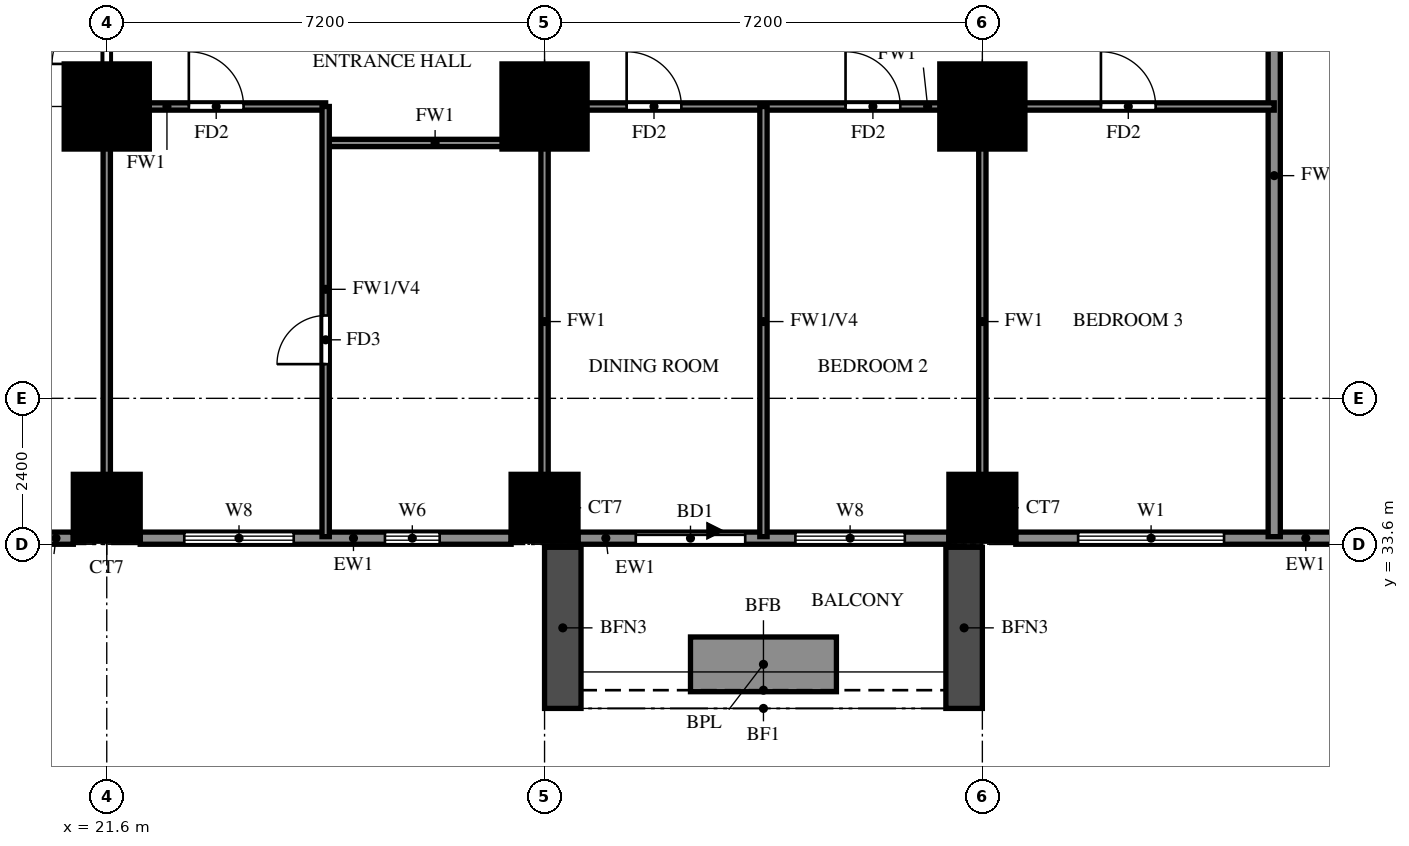
"""IFC4 building model, lengths in metres.
Left out: names, types, materials, properties, quantities, classifications, styles, units other than length and angle.
Written with IfcOpenShell. Run it as: python <this file> out.ifc"""

import sys

from ifc_helpers import new_model, si_unit, direction, frame, frame_2d, origin, origin_2d, place, context, subcontext, project, spatial, rectangle, extrude, source, transform, mapped, element, fill, save


model = new_model("IFC4")
c1 = context("Model", 3, precision=1e-05, world=origin(), true_north=direction((0.0, 1.0)))
c2 = subcontext(c1, "Body", "Model", "MODEL_VIEW")
j1 = project(units=[si_unit("LENGTHUNIT", "METRE"), si_unit("PLANEANGLEUNIT", "RADIAN")], contexts=[c1])
p1 = place(None, origin())
s1 = spatial("IfcSite", under=j1, at=p1, CompositionType="ELEMENT")
p2 = place(p1, origin())
s2 = spatial("IfcBuilding", under=s1, at=p2, CompositionType="ELEMENT")
p3 = place(p2, frame((0.0, 0.0, 55.0)))
s3 = spatial("IfcBuildingStorey", under=s2, at=p3, CompositionType="ELEMENT", Elevation=55.0)
m1 = source(origin(), c2, "Body", "SweptSolid", [
    extrude(rectangle(XDim=1.1, YDim=1.1, at=origin_2d()), origin(), (0.0, 0.0, 1.0), 3.18),
])
for number, where, z_axis, x_axis in (
    (1, (21.6, 34.2, 0.0), (0.0, 0.0, 1.0), (1.0, 0.0, 0.0)),
    (2, (28.8, 34.2, 0.0), (0.0, 0.0, 1.0), (1.0, 0.0, 0.0)),
    (3, (36.0, 34.2, 0.0), (0.0, 0.0, 1.0), (1.0, 0.0, 0.0)),
):
    element("IfcColumn", number, at=place(p3, frame(where, z_axis=z_axis, x_axis=x_axis)), inside=s3, PredefinedType="COLUMN", context=c2, shape_type="MappedRepresentation", body=[
        mapped(m1, transform((0.0, 0.0, 0.0))),
    ])
m2 = source(origin(), c2, "Body", "SweptSolid", [
    extrude(rectangle(XDim=1.4, YDim=1.4, at=origin_2d()), origin(), (0.0, 0.0, 1.0), 3.18),
])
for number, where, z_axis, x_axis in (
    (4, (21.6, 40.8, 0.0), (0.0, 0.0, 1.0), (1.0, 0.0, 0.0)),
    (5, (28.8, 40.8, 0.0), (0.0, 0.0, 1.0), (1.0, 0.0, 0.0)),
    (6, (36.0, 40.8, 0.0), (0.0, 0.0, 1.0), (1.0, 0.0, 0.0)),
):
    element("IfcColumn", number, at=place(p3, frame(where, z_axis=z_axis, x_axis=x_axis)), inside=s3, PredefinedType="COLUMN", context=c2, shape_type="MappedRepresentation", body=[
        mapped(m2, transform((0.0, 0.0, 0.0))),
    ])
p4 = place(p3, frame((18.2, 33.7, 0.0), z_axis=(0.0, 0.0, 1.0), x_axis=(1.0, 0.0, 0.0)))
e7 = element("IfcWall", 7, at=p4, inside=s3, PredefinedType="SOLIDWALL", context=c2, shape_type="SweptSolid", body=[
    extrude(rectangle(XDim=2.85, YDim=0.2, at=frame_2d((1.425, 0.0))), origin(), (0.0, 0.0, 1.0), 3.18),
])
p5 = place(p4, frame((0.525, 0.0, 0.6)))
e8 = element("IfcOpeningElement", 8, at=p5, cuts=e7, PredefinedType="OPENING", context=c2, shape_type="SweptSolid", body=[
    extrude(rectangle(XDim=1.8, YDim=2.4, at=frame_2d((0.9, 1.2))), frame((0.0, 0.11, 0.0), z_axis=(0.0, -1.0, 0.0), x_axis=(1.0, 0.0, 0.0)), (0.0, 0.0, 1.0), 0.22),
])
p6 = place(p3, frame((22.15, 33.7, 0.0), z_axis=(0.0, 0.0, 1.0), x_axis=(1.0, 0.0, 0.0)))
e9 = element("IfcWall", 9, at=p6, inside=s3, PredefinedType="SOLIDWALL", context=c2, shape_type="SweptSolid", body=[
    extrude(rectangle(XDim=6.1, YDim=0.2, at=frame_2d((3.05, 0.0))), origin(), (0.0, 0.0, 1.0), 3.18),
])
p7 = place(p6, frame((0.725, 0.0, 0.6)))
e10 = element("IfcOpeningElement", 10, at=p7, cuts=e9, PredefinedType="OPENING", context=c2, shape_type="SweptSolid", body=[
    extrude(rectangle(XDim=1.8, YDim=2.4, at=frame_2d((0.9, 1.2))), frame((0.0, 0.11, 0.0), z_axis=(0.0, -1.0, 0.0), x_axis=(1.0, 0.0, 0.0)), (0.0, 0.0, 1.0), 0.22),
])
p8 = place(p6, frame((4.025, 0.0, 1.5)))
e11 = element("IfcOpeningElement", 11, at=p8, cuts=e9, PredefinedType="OPENING", context=c2, shape_type="SweptSolid", body=[
    extrude(rectangle(XDim=0.9, YDim=0.9, at=frame_2d((0.45, 0.45))), frame((0.0, 0.11, 0.0), z_axis=(0.0, -1.0, 0.0), x_axis=(1.0, 0.0, 0.0)), (0.0, 0.0, 1.0), 0.22),
])
p9 = place(p3, frame((29.35, 33.7, 0.0), z_axis=(0.0, 0.0, 1.0), x_axis=(1.0, 0.0, 0.0)))
e12 = element("IfcWall", 12, at=p9, inside=s3, PredefinedType="SOLIDWALL", context=c2, shape_type="SweptSolid", body=[
    extrude(rectangle(XDim=6.1, YDim=0.2, at=frame_2d((3.05, 0.0))), origin(), (0.0, 0.0, 1.0), 3.18),
])
p10 = place(p9, frame((0.95, 0.0, 0.0)))
e13 = element("IfcOpeningElement", 13, at=p10, cuts=e12, PredefinedType="OPENING", context=c2, shape_type="SweptSolid", body=[
    extrude(rectangle(XDim=1.8, YDim=2.4, at=frame_2d((0.9, 1.2))), frame((0.0, 0.11, 0.0), z_axis=(0.0, -1.0, 0.0), x_axis=(1.0, 0.0, 0.0)), (0.0, 0.0, 1.0), 0.22),
])
p11 = place(p9, frame((3.575, 0.0, 0.6)))
e14 = element("IfcOpeningElement", 14, at=p11, cuts=e12, PredefinedType="OPENING", context=c2, shape_type="SweptSolid", body=[
    extrude(rectangle(XDim=1.8, YDim=2.4, at=frame_2d((0.9, 1.2))), frame((0.0, 0.11, 0.0), z_axis=(0.0, -1.0, 0.0), x_axis=(1.0, 0.0, 0.0)), (0.0, 0.0, 1.0), 0.22),
])
p12 = place(p3, frame((36.55, 33.7, 0.0), z_axis=(0.0, 0.0, 1.0), x_axis=(1.0, 0.0, 0.0)))
e15 = element("IfcWall", 15, at=p12, inside=s3, PredefinedType="SOLIDWALL", context=c2, shape_type="SweptSolid", body=[
    extrude(rectangle(XDim=5.45, YDim=0.2, at=frame_2d((2.725, 0.0))), origin(), (0.0, 0.0, 1.0), 3.18),
])
p13 = place(p12, frame((1.025, 0.0, 0.6)))
e16 = element("IfcOpeningElement", 16, at=p13, cuts=e15, PredefinedType="OPENING", context=c2, shape_type="SweptSolid", body=[
    extrude(rectangle(XDim=2.4, YDim=2.4, at=frame_2d((1.2, 1.2))), frame((0.0, 0.11, 0.0), z_axis=(0.0, -1.0, 0.0), x_axis=(1.0, 0.0, 0.0)), (0.0, 0.0, 1.0), 0.22),
])
for number, where, z_axis, x_axis in (
    (17, (29.1, 33.55, 0.0), (0.0, 0.0, 1.0), (0.0, -1.0, 0.0)),
    (18, (35.7, 33.55, 0.0), (0.0, 0.0, 1.0), (0.0, -1.0, 0.0)),
):
    element("IfcWall", number, at=place(p3, frame(where, z_axis=z_axis, x_axis=x_axis)), inside=s3, PredefinedType="SOLIDWALL", context=c2, shape_type="SweptSolid", body=[
        extrude(rectangle(XDim=2.65, YDim=0.6, at=frame_2d((1.325, 0.0))), origin(), (0.0, 0.0, 1.0), 2.85),
    ])
p14 = place(p3, frame((31.2, 31.625, 0.0), z_axis=(0.0, 0.0, 1.0), x_axis=(1.0, 0.0, 0.0)))
e19 = element("IfcWall", 19, at=p14, inside=s3, PredefinedType="SOLIDWALL", context=c2, shape_type="SweptSolid", body=[
    extrude(rectangle(XDim=2.4, YDim=0.9, at=frame_2d((1.2, 0.0))), origin(), (0.0, 0.0, 1.0), 0.9),
])
p15 = place(p3, frame((40.8, 33.725, 0.0), z_axis=(0.0, 0.0, 1.0), x_axis=(0.0, 1.0, 0.0)))
e20 = element("IfcWall", 20, at=p15, inside=s3, PredefinedType="SOLIDWALL", context=c2, shape_type="SweptSolid", body=[
    extrude(rectangle(XDim=11.875, YDim=0.2, at=frame_2d((5.938, 0.0))), origin(), (0.0, 0.0, 1.0), 2.28),
])
p16 = place(p3, frame((25.2, 40.2, 0.0), z_axis=(0.0, 0.0, 1.0), x_axis=(1.0, 0.0, 0.0)))
e21 = element("IfcWall", 21, at=p16, inside=s3, PredefinedType="PARTITIONING", context=c2, shape_type="SweptSolid", body=[
    extrude(rectangle(XDim=3.6, YDim=0.12, at=frame_2d((1.8, 0.0))), origin(), (0.0, 0.0, 1.0), 3.18),
])
p17 = place(p3, frame((21.6, 40.8, 0.0), z_axis=(0.0, 0.0, 1.0), x_axis=(1.0, 0.0, 0.0)))
e22 = element("IfcWall", 22, at=p17, inside=s3, PredefinedType="PARTITIONING", context=c2, shape_type="SweptSolid", body=[
    extrude(rectangle(XDim=3.6, YDim=0.12, at=frame_2d((1.8, 0.0))), origin(), (0.0, 0.0, 1.0), 3.18),
])
p18 = place(p17, frame((1.35, 0.0, 0.0)))
e23 = element("IfcOpeningElement", 23, at=p18, cuts=e22, PredefinedType="OPENING", context=c2, shape_type="SweptSolid", body=[
    extrude(rectangle(XDim=0.9, YDim=2.1, at=frame_2d((0.45, 1.05))), frame((0.0, 0.07, 0.0), z_axis=(0.0, -1.0, 0.0), x_axis=(1.0, 0.0, 0.0)), (0.0, 0.0, 1.0), 0.14),
])
p19 = place(p3, frame((28.8, 40.8, 0.0), z_axis=(0.0, 0.0, 1.0), x_axis=(1.0, 0.0, 0.0)))
e24 = element("IfcWall", 24, at=p19, inside=s3, PredefinedType="PARTITIONING", context=c2, shape_type="SweptSolid", body=[
    extrude(rectangle(XDim=12.0, YDim=0.12, at=frame_2d((6.0, 0.0))), origin(), (0.0, 0.0, 1.0), 3.18),
])
p20 = place(p19, frame((1.35, 0.0, 0.0)))
e25 = element("IfcOpeningElement", 25, at=p20, cuts=e24, PredefinedType="OPENING", context=c2, shape_type="SweptSolid", body=[
    extrude(rectangle(XDim=0.9, YDim=2.1, at=frame_2d((0.45, 1.05))), frame((0.0, 0.07, 0.0), z_axis=(0.0, -1.0, 0.0), x_axis=(1.0, 0.0, 0.0)), (0.0, 0.0, 1.0), 0.14),
])
p21 = place(p19, frame((4.95, 0.0, 0.0)))
e26 = element("IfcOpeningElement", 26, at=p21, cuts=e24, PredefinedType="OPENING", context=c2, shape_type="SweptSolid", body=[
    extrude(rectangle(XDim=0.9, YDim=2.1, at=frame_2d((0.45, 1.05))), frame((0.0, 0.07, 0.0), z_axis=(0.0, -1.0, 0.0), x_axis=(1.0, 0.0, 0.0)), (0.0, 0.0, 1.0), 0.14),
])
p22 = place(p19, frame((9.15, 0.0, 0.0)))
e27 = element("IfcOpeningElement", 27, at=p22, cuts=e24, PredefinedType="OPENING", context=c2, shape_type="SweptSolid", body=[
    extrude(rectangle(XDim=0.9, YDim=2.1, at=frame_2d((0.45, 1.05))), frame((0.0, 0.07, 0.0), z_axis=(0.0, -1.0, 0.0), x_axis=(1.0, 0.0, 0.0)), (0.0, 0.0, 1.0), 0.14),
])
p23 = place(p3, frame((21.6, 33.725, 0.0), z_axis=(0.0, 0.0, 1.0), x_axis=(0.0, 1.0, 0.0)))
e28 = element("IfcWall", 28, at=p23, inside=s3, PredefinedType="PARTITIONING", context=c2, shape_type="SweptSolid", body=[
    extrude(rectangle(XDim=17.875, YDim=0.12, at=frame_2d((8.938, 0.0))), origin(), (0.0, 0.0, 1.0), 3.18),
])
p24 = place(p23, frame((7.775, 0.0, 0.0)))
e29 = element("IfcOpeningElement", 29, at=p24, cuts=e28, PredefinedType="OPENING", context=c2, shape_type="SweptSolid", body=[
    extrude(rectangle(XDim=0.9, YDim=2.1, at=frame_2d((0.45, 1.05))), frame((0.0, 0.07, 0.0), z_axis=(0.0, -1.0, 0.0), x_axis=(1.0, 0.0, 0.0)), (0.0, 0.0, 1.0), 0.14),
])
p25 = place(p23, frame((15.625, 0.0, 0.0)))
e30 = element("IfcOpeningElement", 30, at=p25, cuts=e28, PredefinedType="OPENING", context=c2, shape_type="SweptSolid", body=[
    extrude(rectangle(XDim=0.9, YDim=2.1, at=frame_2d((0.45, 1.05))), frame((0.0, 0.07, 0.0), z_axis=(0.0, -1.0, 0.0), x_axis=(1.0, 0.0, 0.0)), (0.0, 0.0, 1.0), 0.14),
])
p26 = place(p3, frame((25.2, 33.725, 0.0), z_axis=(0.0, 0.0, 1.0), x_axis=(0.0, 1.0, 0.0)))
e31 = element("IfcWall", 31, at=p26, inside=s3, PredefinedType="PARTITIONING", context=c2, shape_type="SweptSolid", body=[
    extrude(rectangle(XDim=7.075, YDim=0.12, at=frame_2d((3.538, 0.0))), origin(), (0.0, 0.0, 1.0), 2.28),
])
p27 = place(p26, frame((2.837, 0.0, 0.0)))
e32 = element("IfcOpeningElement", 32, at=p27, cuts=e31, PredefinedType="OPENING", context=c2, shape_type="SweptSolid", body=[
    extrude(rectangle(XDim=0.8, YDim=2.1, at=frame_2d((0.4, 1.05))), frame((0.0, 0.07, 0.0), z_axis=(0.0, -1.0, 0.0), x_axis=(1.0, 0.0, 0.0)), (0.0, 0.0, 1.0), 0.14),
])
p28 = place(p3, frame((28.8, 33.725, 0.0), z_axis=(0.0, 0.0, 1.0), x_axis=(0.0, 1.0, 0.0)))
e33 = element("IfcWall", 33, at=p28, inside=s3, PredefinedType="PARTITIONING", context=c2, shape_type="SweptSolid", body=[
    extrude(rectangle(XDim=7.075, YDim=0.12, at=frame_2d((3.538, 0.0))), origin(), (0.0, 0.0, 1.0), 3.18),
])
p29 = place(p3, frame((32.4, 33.725, 0.0), z_axis=(0.0, 0.0, 1.0), x_axis=(0.0, 1.0, 0.0)))
e34 = element("IfcWall", 34, at=p29, inside=s3, PredefinedType="PARTITIONING", context=c2, shape_type="SweptSolid", body=[
    extrude(rectangle(XDim=7.075, YDim=0.12, at=frame_2d((3.538, 0.0))), origin(), (0.0, 0.0, 1.0), 2.28),
])
p30 = place(p3, frame((36.0, 33.725, 0.0), z_axis=(0.0, 0.0, 1.0), x_axis=(0.0, 1.0, 0.0)))
e35 = element("IfcWall", 35, at=p30, inside=s3, PredefinedType="PARTITIONING", context=c2, shape_type="SweptSolid", body=[
    extrude(rectangle(XDim=7.075, YDim=0.12, at=frame_2d((3.538, 0.0))), origin(), (0.0, 0.0, 1.0), 3.18),
])
p31 = place(p7, origin())
e36 = element("IfcWindow", 36, at=p31, inside=s3, PartitioningType="DOUBLE_PANEL_VERTICAL", PredefinedType="WINDOW", context=c2, shape_type="SweptSolid", body=[
    extrude(rectangle(XDim=1.8, YDim=2.4, at=frame_2d((0.9, 1.2))), frame((0.0, 0.03, 0.0), z_axis=(0.0, -1.0, 0.0), x_axis=(1.0, 0.0, 0.0)), (0.0, 0.0, 1.0), 0.06),
])
fill(e10, e36)
p32 = place(p8, origin())
e37 = element("IfcWindow", 37, at=p32, inside=s3, PartitioningType="SINGLE_PANEL", PredefinedType="WINDOW", context=c2, shape_type="SweptSolid", body=[
    extrude(rectangle(XDim=0.9, YDim=0.9, at=frame_2d((0.45, 0.45))), frame((0.0, 0.03, 0.0), z_axis=(0.0, -1.0, 0.0), x_axis=(1.0, 0.0, 0.0)), (0.0, 0.0, 1.0), 0.06),
])
fill(e11, e37)
p33 = place(p10, origin())
e38 = element("IfcDoor", 38, at=p33, inside=s3, OperationType="DOUBLE_DOOR_SLIDING", PredefinedType="DOOR", context=c2, shape_type="SweptSolid", body=[
    extrude(rectangle(XDim=1.8, YDim=2.4, at=frame_2d((0.9, 1.2))), frame((0.0, 0.025, 0.0), z_axis=(0.0, -1.0, 0.0), x_axis=(1.0, 0.0, 0.0)), (0.0, 0.0, 1.0), 0.05),
])
fill(e13, e38)
p34 = place(p11, origin())
e39 = element("IfcWindow", 39, at=p34, inside=s3, PartitioningType="DOUBLE_PANEL_VERTICAL", PredefinedType="WINDOW", context=c2, shape_type="SweptSolid", body=[
    extrude(rectangle(XDim=1.8, YDim=2.4, at=frame_2d((0.9, 1.2))), frame((0.0, 0.03, 0.0), z_axis=(0.0, -1.0, 0.0), x_axis=(1.0, 0.0, 0.0)), (0.0, 0.0, 1.0), 0.06),
])
fill(e14, e39)
p35 = place(p13, origin())
e40 = element("IfcWindow", 40, at=p35, inside=s3, PartitioningType="DOUBLE_PANEL_VERTICAL", PredefinedType="WINDOW", context=c2, shape_type="SweptSolid", body=[
    extrude(rectangle(XDim=2.4, YDim=2.4, at=frame_2d((1.2, 1.2))), frame((0.0, 0.03, 0.0), z_axis=(0.0, -1.0, 0.0), x_axis=(1.0, 0.0, 0.0)), (0.0, 0.0, 1.0), 0.06),
])
fill(e16, e40)
p36 = place(p24, origin())
e41 = element("IfcDoor", 41, at=p36, inside=s3, OperationType="SINGLE_SWING_RIGHT", PredefinedType="DOOR", context=c2, shape_type="SweptSolid", body=[
    extrude(rectangle(XDim=0.9, YDim=2.1, at=frame_2d((0.45, 1.05))), frame((0.0, 0.025, 0.0), z_axis=(0.0, -1.0, 0.0), x_axis=(1.0, 0.0, 0.0)), (0.0, 0.0, 1.0), 0.05),
])
fill(e29, e41)
p37 = place(p18, origin())
e42 = element("IfcDoor", 42, at=p37, inside=s3, OperationType="SINGLE_SWING_RIGHT", PredefinedType="DOOR", context=c2, shape_type="SweptSolid", body=[
    extrude(rectangle(XDim=0.9, YDim=2.1, at=frame_2d((0.45, 1.05))), frame((0.0, 0.025, 0.0), z_axis=(0.0, -1.0, 0.0), x_axis=(1.0, 0.0, 0.0)), (0.0, 0.0, 1.0), 0.05),
])
fill(e23, e42)
p38 = place(p27, origin())
e43 = element("IfcDoor", 43, at=p38, inside=s3, OperationType="SINGLE_SWING_LEFT", PredefinedType="DOOR", context=c2, shape_type="SweptSolid", body=[
    extrude(rectangle(XDim=0.8, YDim=2.1, at=frame_2d((0.4, 1.05))), frame((0.0, 0.025, 0.0), z_axis=(0.0, -1.0, 0.0), x_axis=(1.0, 0.0, 0.0)), (0.0, 0.0, 1.0), 0.05),
])
fill(e32, e43)
p39 = place(p20, origin())
e44 = element("IfcDoor", 44, at=p39, inside=s3, OperationType="SINGLE_SWING_LEFT", PredefinedType="DOOR", context=c2, shape_type="SweptSolid", body=[
    extrude(rectangle(XDim=0.9, YDim=2.1, at=frame_2d((0.45, 1.05))), frame((0.0, 0.025, 0.0), z_axis=(0.0, -1.0, 0.0), x_axis=(1.0, 0.0, 0.0)), (0.0, 0.0, 1.0), 0.05),
])
fill(e25, e44)
p40 = place(p21, origin())
e45 = element("IfcDoor", 45, at=p40, inside=s3, OperationType="SINGLE_SWING_RIGHT", PredefinedType="DOOR", context=c2, shape_type="SweptSolid", body=[
    extrude(rectangle(XDim=0.9, YDim=2.1, at=frame_2d((0.45, 1.05))), frame((0.0, 0.025, 0.0), z_axis=(0.0, -1.0, 0.0), x_axis=(1.0, 0.0, 0.0)), (0.0, 0.0, 1.0), 0.05),
])
fill(e26, e45)
p41 = place(p22, origin())
e46 = element("IfcDoor", 46, at=p41, inside=s3, OperationType="SINGLE_SWING_LEFT", PredefinedType="DOOR", context=c2, shape_type="SweptSolid", body=[
    extrude(rectangle(XDim=0.9, YDim=2.1, at=frame_2d((0.45, 1.05))), frame((0.0, 0.025, 0.0), z_axis=(0.0, -1.0, 0.0), x_axis=(1.0, 0.0, 0.0)), (0.0, 0.0, 1.0), 0.05),
])
fill(e27, e46)
save(model, sys.argv[1])
